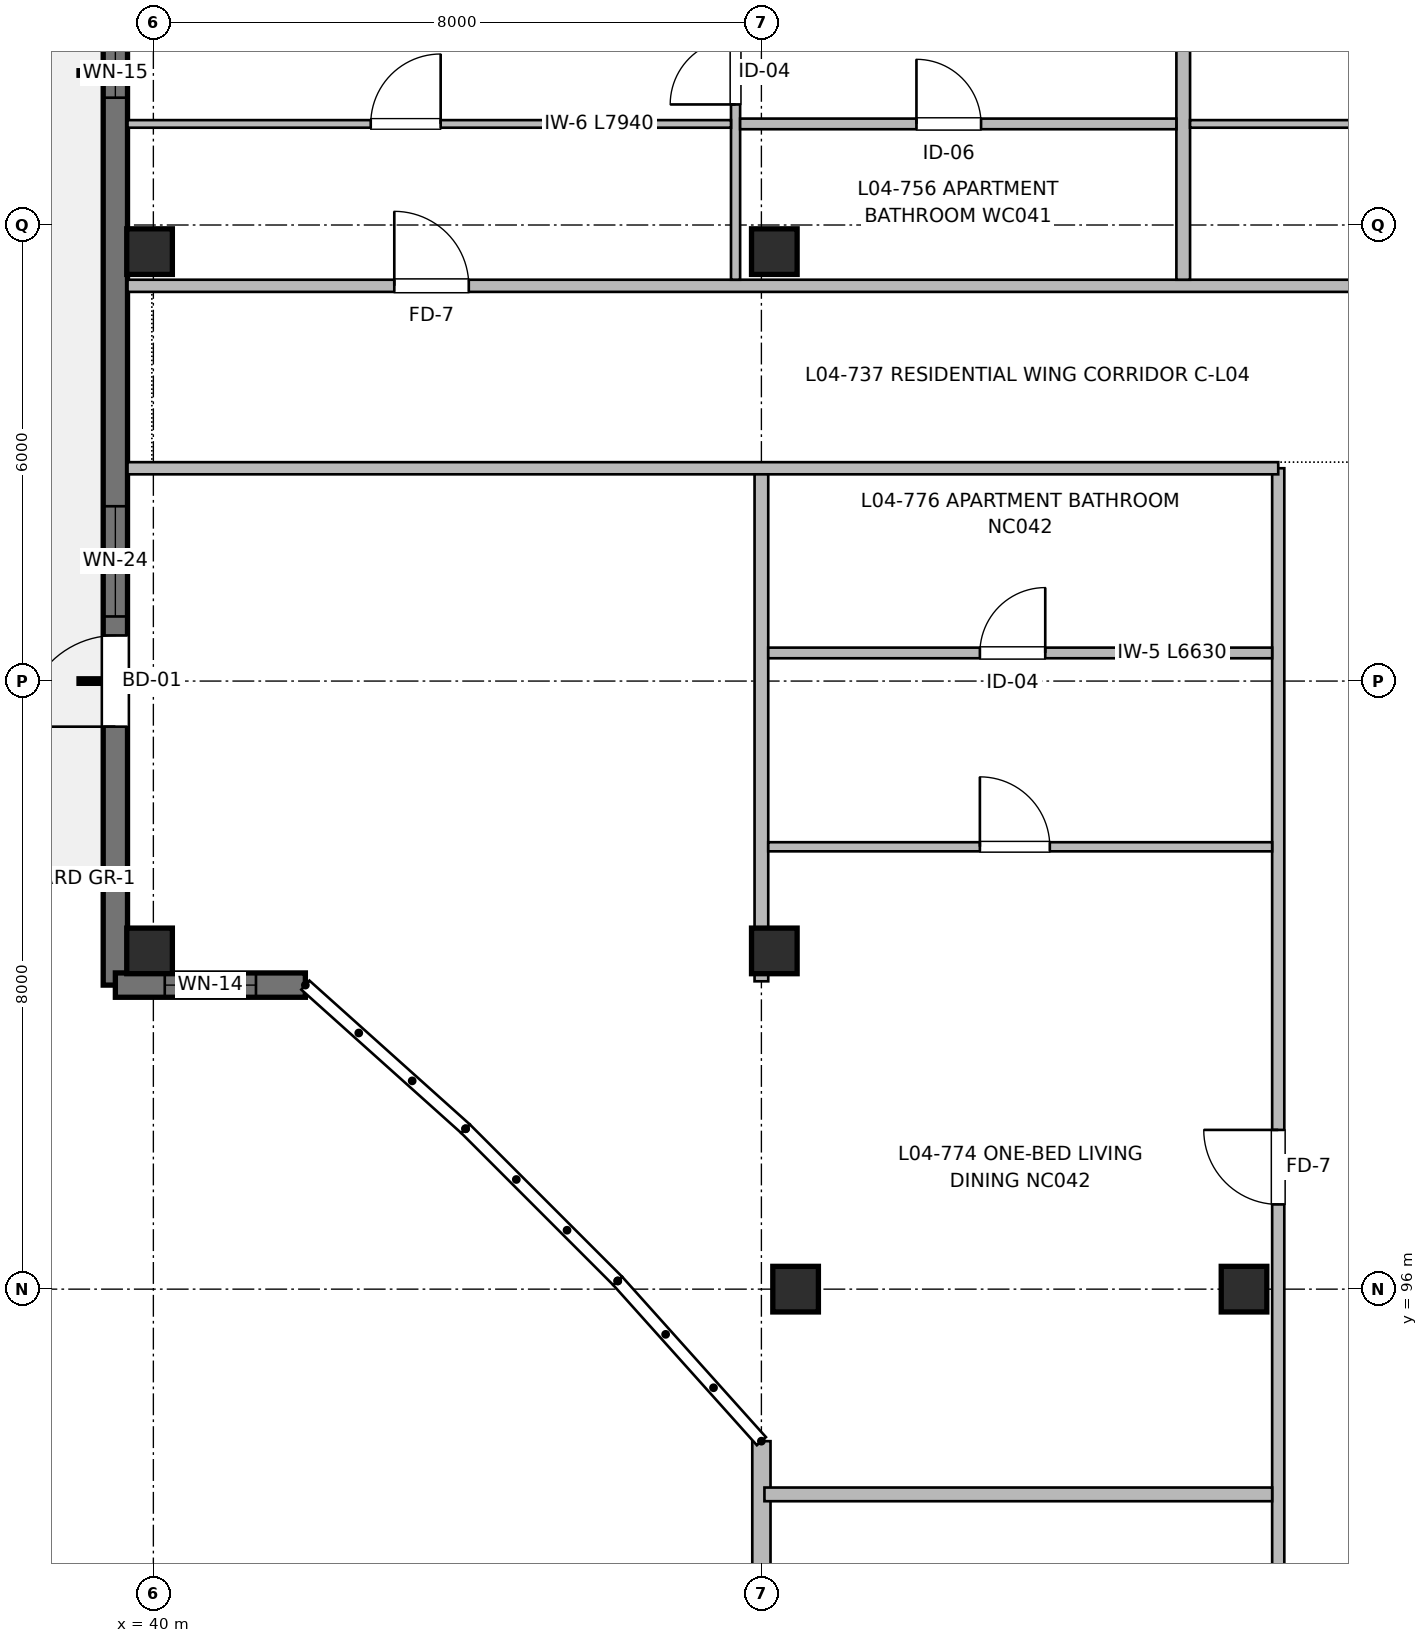
"""IFC4 building model, lengths in metres.
Left out: names, types, materials, properties, quantities, classifications, styles, units other than length and angle.
Written with IfcOpenShell. Run it as: python <this file> out.ifc"""

import sys

from ifc_helpers import new_model, si_unit, direction, frame, frame_2d, origin, origin_2d, place, context, subcontext, project, spatial, rectangle, extrude, element, fill, save


model = new_model("IFC4")
c1 = context("Model", 3, precision=1e-05, world=origin(), true_north=direction((0.0, 1.0)))
c2 = subcontext(c1, "Body", "Model", "MODEL_VIEW")
j1 = project(units=[si_unit("LENGTHUNIT", "METRE"), si_unit("PLANEANGLEUNIT", "RADIAN")], contexts=[c1])
p1 = place(None, origin())
s1 = spatial("IfcSite", under=j1, at=p1, CompositionType="ELEMENT")
p2 = place(p1, origin())
s2 = spatial("IfcBuilding", under=s1, at=p2, CompositionType="ELEMENT")
p3 = place(p2, frame((0.0, 0.0, 13.76)))
s3 = spatial("IfcBuildingStorey", under=s2, at=p3, CompositionType="ELEMENT", Elevation=13.76)
for number, where, z_axis, x_axis in (
    (1, (39.95, 100.45, 0.0), (0.0, 0.0, 1.0), (1.0, 0.0, 0.0)),
    (2, (39.95, 109.65, 0.0), (0.0, 0.0, 1.0), (1.0, 0.0, 0.0)),
    (3, (48.17, 100.45, 0.0), (0.0, 0.0, 1.0), (1.0, 0.0, 0.0)),
    (4, (48.17, 109.65, 0.0), (0.0, 0.0, 1.0), (1.0, 0.0, 0.0)),
    (5, (48.45, 96.0, 0.0), (0.0, 0.0, 1.0), (1.0, 0.0, 0.0)),
    (6, (54.35, 96.0, 0.0), (0.0, 0.0, 1.0), (1.0, 0.0, 0.0)),
):
    element("IfcColumn", number, at=place(p3, frame(where, z_axis=z_axis, x_axis=x_axis)), inside=s3, PredefinedType="COLUMN", context=c2, shape_type="SweptSolid", body=[
        extrude(rectangle(XDim=0.6, YDim=0.6, at=origin_2d()), origin(), (0.0, 0.0, 1.0), 3.2),
    ])
p4 = place(p3, frame((39.5, 100.0, 0.0), z_axis=(0.0, 0.0, 1.0), x_axis=(0.0, 1.0, 0.0)))
e7 = element("IfcWall", 7, at=p4, inside=s3, PredefinedType="SHEAR", context=c2, shape_type="SweptSolid", body=[
    extrude(rectangle(XDim=16.0, YDim=0.32, at=frame_2d((8.0, 0.0))), origin(), (0.0, 0.0, 1.0), 2.98),
])
p5 = place(p4, frame((3.4, 0.0, 0.0)))
e8 = element("IfcOpeningElement", 8, at=p5, cuts=e7, PredefinedType="OPENING", context=c2, shape_type="SweptSolid", body=[
    extrude(rectangle(XDim=1.2, YDim=2.2, at=frame_2d((0.6, 1.1))), frame((0.0, 0.17, 0.0), z_axis=(0.0, -1.0, 0.0), x_axis=(1.0, 0.0, 0.0)), (0.0, 0.0, 1.0), 0.34),
])
p6 = place(p4, frame((4.85, 0.0, 0.77)))
e9 = element("IfcOpeningElement", 9, at=p6, cuts=e7, PredefinedType="OPENING", context=c2, shape_type="SweptSolid", body=[
    extrude(rectangle(XDim=1.45, YDim=1.45, at=frame_2d((0.725, 0.725))), frame((0.0, 0.17, 0.0), z_axis=(0.0, -1.0, 0.0), x_axis=(1.0, 0.0, 0.0)), (0.0, 0.0, 1.0), 0.34),
])
p7 = place(p4, frame((11.675, 0.0, 0.9)))
e10 = element("IfcOpeningElement", 10, at=p7, cuts=e7, PredefinedType="OPENING", context=c2, shape_type="SweptSolid", body=[
    extrude(rectangle(XDim=0.65, YDim=0.95, at=frame_2d((0.325, 0.475))), frame((0.0, 0.17, 0.0), z_axis=(0.0, -1.0, 0.0), x_axis=(1.0, 0.0, 0.0)), (0.0, 0.0, 1.0), 0.34),
])
p8 = place(p3, frame((42.0, 100.0, 0.0), z_axis=(0.0, 0.0, 1.0), x_axis=(-1.0, 0.0, 0.0)))
e11 = element("IfcWall", 11, at=p8, inside=s3, PredefinedType="SHEAR", context=c2, shape_type="SweptSolid", body=[
    extrude(rectangle(XDim=2.5, YDim=0.32, at=frame_2d((1.25, 0.0))), origin(), (0.0, 0.0, 1.0), 2.98),
])
p9 = place(p8, frame((0.65, 0.0, 0.9)))
e12 = element("IfcOpeningElement", 12, at=p9, cuts=e11, PredefinedType="OPENING", context=c2, shape_type="SweptSolid", body=[
    extrude(rectangle(XDim=1.2, YDim=1.05, at=frame_2d((0.6, 0.525))), frame((0.0, 0.17, 0.0), z_axis=(0.0, -1.0, 0.0), x_axis=(1.0, 0.0, 0.0)), (0.0, 0.0, 1.0), 0.34),
])
p10 = place(p3, frame((48.0, 56.0, 0.0), z_axis=(0.0, 0.0, 1.0), x_axis=(0.0, 1.0, 0.0)))
e13 = element("IfcWall", 13, at=p10, inside=s3, PredefinedType="SOLIDWALL", context=c2, shape_type="SweptSolid", body=[
    extrude(rectangle(XDim=38.0, YDim=0.24, at=frame_2d((19.0, 0.0))), origin(), (0.0, 0.0, 1.0), 2.98),
])
p11 = place(p10, frame((4.15, 0.0, 0.0)))
e14 = element("IfcOpeningElement", 14, at=p11, cuts=e13, PredefinedType="OPENING", context=c2, shape_type="SweptSolid", body=[
    extrude(rectangle(XDim=1.2, YDim=2.2, at=frame_2d((0.6, 1.1))), frame((0.0, 0.13, 0.0), z_axis=(0.0, -1.0, 0.0), x_axis=(1.0, 0.0, 0.0)), (0.0, 0.0, 1.0), 0.26),
])
p12 = place(p10, frame((6.05, 0.0, 0.77)))
e15 = element("IfcOpeningElement", 15, at=p12, cuts=e13, PredefinedType="OPENING", context=c2, shape_type="SweptSolid", body=[
    extrude(rectangle(XDim=1.45, YDim=1.45, at=frame_2d((0.725, 0.725))), frame((0.0, 0.13, 0.0), z_axis=(0.0, -1.0, 0.0), x_axis=(1.0, 0.0, 0.0)), (0.0, 0.0, 1.0), 0.26),
])
p13 = place(p10, frame((13.925, 0.0, 0.9)))
e16 = element("IfcOpeningElement", 16, at=p13, cuts=e13, PredefinedType="OPENING", context=c2, shape_type="SweptSolid", body=[
    extrude(rectangle(XDim=0.65, YDim=0.95, at=frame_2d((0.325, 0.475))), frame((0.0, 0.13, 0.0), z_axis=(0.0, -1.0, 0.0), x_axis=(1.0, 0.0, 0.0)), (0.0, 0.0, 1.0), 0.26),
])
p14 = place(p10, frame((24.05, 0.0, 0.62)))
e17 = element("IfcOpeningElement", 17, at=p14, cuts=e13, PredefinedType="OPENING", context=c2, shape_type="SweptSolid", body=[
    extrude(rectangle(XDim=1.1, YDim=1.6, at=frame_2d((0.55, 0.8))), frame((0.0, 0.13, 0.0), z_axis=(0.0, -1.0, 0.0), x_axis=(1.0, 0.0, 0.0)), (0.0, 0.0, 1.0), 0.26),
])
p15 = place(p10, frame((31.9, 0.0, 0.47)))
e18 = element("IfcOpeningElement", 18, at=p15, cuts=e13, PredefinedType="OPENING", context=c2, shape_type="SweptSolid", body=[
    extrude(rectangle(XDim=2.7, YDim=1.75, at=frame_2d((1.35, 0.875))), frame((0.0, 0.13, 0.0), z_axis=(0.0, -1.0, 0.0), x_axis=(1.0, 0.0, 0.0)), (0.0, 0.0, 1.0), 0.26),
])
p16 = place(p3, frame((54.8, 56.16, 0.0), z_axis=(0.0, 0.0, 1.0), x_axis=(0.0, 1.0, 0.0)))
e19 = element("IfcWall", 19, at=p16, inside=s3, PredefinedType="PARTITIONING", context=c2, shape_type="SweptSolid", body=[
    extrude(rectangle(XDim=50.64, YDim=0.16, at=frame_2d((25.32, 0.0))), origin(), (0.0, 0.0, 1.0), 2.935),
])
p17 = place(p16, frame((12.84, 0.0, 0.0)))
e20 = element("IfcOpeningElement", 20, at=p17, cuts=e19, PredefinedType="OPENING", context=c2, shape_type="SweptSolid", body=[
    extrude(rectangle(XDim=1.1, YDim=2.15, at=frame_2d((0.55, 1.075))), frame((0.0, 0.09, 0.0), z_axis=(0.0, -1.0, 0.0), x_axis=(1.0, 0.0, 0.0)), (0.0, 0.0, 1.0), 0.18),
])
p18 = place(p16, frame((19.24, 0.0, 0.0)))
e21 = element("IfcOpeningElement", 21, at=p18, cuts=e19, PredefinedType="OPENING", context=c2, shape_type="SweptSolid", body=[
    extrude(rectangle(XDim=1.6, YDim=2.15, at=frame_2d((0.8, 1.075))), frame((0.0, 0.09, 0.0), z_axis=(0.0, -1.0, 0.0), x_axis=(1.0, 0.0, 0.0)), (0.0, 0.0, 1.0), 0.18),
])
p19 = place(p16, frame((1.8, 0.0, 0.0)))
e22 = element("IfcOpeningElement", 22, at=p19, cuts=e19, PredefinedType="OPENING", context=c2, shape_type="SweptSolid", body=[
    extrude(rectangle(XDim=0.96, YDim=2.15, at=frame_2d((0.48, 1.075))), frame((0.0, 0.09, 0.0), z_axis=(0.0, -1.0, 0.0), x_axis=(1.0, 0.0, 0.0)), (0.0, 0.0, 1.0), 0.18),
])
p20 = place(p16, frame((32.745, 0.0, 0.0)))
e23 = element("IfcOpeningElement", 23, at=p20, cuts=e19, PredefinedType="OPENING", context=c2, shape_type="SweptSolid", body=[
    extrude(rectangle(XDim=0.98, YDim=2.15, at=frame_2d((0.49, 1.075))), frame((0.0, 0.09, 0.0), z_axis=(0.0, -1.0, 0.0), x_axis=(1.0, 0.0, 0.0)), (0.0, 0.0, 1.0), 0.18),
])
p21 = place(p16, frame((40.955, 0.0, 0.0)))
e24 = element("IfcOpeningElement", 24, at=p21, cuts=e19, PredefinedType="OPENING", context=c2, shape_type="SweptSolid", body=[
    extrude(rectangle(XDim=0.98, YDim=2.15, at=frame_2d((0.49, 1.075))), frame((0.0, 0.09, 0.0), z_axis=(0.0, -1.0, 0.0), x_axis=(1.0, 0.0, 0.0)), (0.0, 0.0, 1.0), 0.18),
])
p22 = place(p3, frame((39.66, 106.8, 0.0), z_axis=(0.0, 0.0, 1.0), x_axis=(1.0, 0.0, 0.0)))
e25 = element("IfcWall", 25, at=p22, inside=s3, PredefinedType="PARTITIONING", context=c2, shape_type="SweptSolid", body=[
    extrude(rectangle(XDim=15.14, YDim=0.16, at=frame_2d((7.57, 0.0))), origin(), (0.0, 0.0, 1.0), 2.935),
])
p23 = place(p3, frame((39.66, 109.2, 0.0), z_axis=(0.0, 0.0, 1.0), x_axis=(1.0, 0.0, 0.0)))
e26 = element("IfcWall", 26, at=p23, inside=s3, PredefinedType="PARTITIONING", context=c2, shape_type="SweptSolid", body=[
    extrude(rectangle(XDim=41.68, YDim=0.16, at=frame_2d((20.84, 0.0))), origin(), (0.0, 0.0, 1.0), 2.935),
])
p24 = place(p23, frame((3.51, 0.0, 0.0)))
e27 = element("IfcOpeningElement", 27, at=p24, cuts=e26, PredefinedType="OPENING", context=c2, shape_type="SweptSolid", body=[
    extrude(rectangle(XDim=0.98, YDim=2.15, at=frame_2d((0.49, 1.075))), frame((0.0, 0.09, 0.0), z_axis=(0.0, -1.0, 0.0), x_axis=(1.0, 0.0, 0.0)), (0.0, 0.0, 1.0), 0.18),
])
p25 = place(p23, frame((17.47, 0.0, 0.0)))
e28 = element("IfcOpeningElement", 28, at=p25, cuts=e26, PredefinedType="OPENING", context=c2, shape_type="SweptSolid", body=[
    extrude(rectangle(XDim=0.98, YDim=2.15, at=frame_2d((0.49, 1.075))), frame((0.0, 0.09, 0.0), z_axis=(0.0, -1.0, 0.0), x_axis=(1.0, 0.0, 0.0)), (0.0, 0.0, 1.0), 0.18),
])
p26 = place(p23, frame((31.39, 0.0, 0.0)))
e29 = element("IfcOpeningElement", 29, at=p26, cuts=e26, PredefinedType="OPENING", context=c2, shape_type="SweptSolid", body=[
    extrude(rectangle(XDim=0.98, YDim=2.15, at=frame_2d((0.49, 1.075))), frame((0.0, 0.09, 0.0), z_axis=(0.0, -1.0, 0.0), x_axis=(1.0, 0.0, 0.0)), (0.0, 0.0, 1.0), 0.18),
])
p27 = place(p3, frame((48.0, 100.05, 0.0), z_axis=(0.0, 0.0, 1.0), x_axis=(0.0, 1.0, 0.0)))
e30 = element("IfcWall", 30, at=p27, inside=s3, PredefinedType="PARTITIONING", context=c2, shape_type="SweptSolid", body=[
    extrude(rectangle(XDim=6.67, YDim=0.18, at=frame_2d((3.335, 0.0))), origin(), (0.0, 0.0, 1.0), 2.68),
])
p28 = place(p3, frame((53.55, 109.28, 0.0), z_axis=(0.0, 0.0, 1.0), x_axis=(0.0, 1.0, 0.0)))
e31 = element("IfcWall", 31, at=p28, inside=s3, PredefinedType="PARTITIONING", context=c2, shape_type="SweptSolid", body=[
    extrude(rectangle(XDim=6.6, YDim=0.18, at=frame_2d((3.3, 0.0))), origin(), (0.0, 0.0, 1.0), 2.935),
])
p29 = place(p3, frame((47.66, 109.28, 0.0), z_axis=(0.0, 0.0, 1.0), x_axis=(0.0, 1.0, 0.0)))
e32 = element("IfcWall", 32, at=p29, inside=s3, PredefinedType="PARTITIONING", context=c2, shape_type="SweptSolid", body=[
    extrude(rectangle(XDim=6.6, YDim=0.12, at=frame_2d((3.3, 0.0))), origin(), (0.0, 0.0, 1.0), 2.935),
])
p30 = place(p29, frame((2.306, 0.0, 0.0)))
e33 = element("IfcOpeningElement", 33, at=p30, cuts=e32, PredefinedType="OPENING", context=c2, shape_type="SweptSolid", body=[
    extrude(rectangle(XDim=0.86, YDim=2.1, at=frame_2d((0.43, 1.05))), frame((0.0, 0.07, 0.0), z_axis=(0.0, -1.0, 0.0), x_axis=(1.0, 0.0, 0.0)), (0.0, 0.0, 1.0), 0.14),
])
p31 = place(p29, frame((4.097, 0.0, 0.0)))
e34 = element("IfcOpeningElement", 34, at=p31, cuts=e32, PredefinedType="OPENING", context=c2, shape_type="SweptSolid", body=[
    extrude(rectangle(XDim=0.9, YDim=2.1, at=frame_2d((0.45, 1.05))), frame((0.0, 0.07, 0.0), z_axis=(0.0, -1.0, 0.0), x_axis=(1.0, 0.0, 0.0)), (0.0, 0.0, 1.0), 0.14),
])
p32 = place(p3, frame((47.72, 111.33, 0.0), z_axis=(0.0, 0.0, 1.0), x_axis=(1.0, 0.0, 0.0)))
e35 = element("IfcWall", 35, at=p32, inside=s3, PredefinedType="PARTITIONING", context=c2, shape_type="SweptSolid", body=[
    extrude(rectangle(XDim=5.74, YDim=0.14, at=frame_2d((2.87, 0.0))), origin(), (0.0, 0.0, 1.0), 2.935),
])
p33 = place(p32, frame((2.32, 0.0, 0.0)))
e36 = element("IfcOpeningElement", 36, at=p33, cuts=e35, PredefinedType="OPENING", context=c2, shape_type="SweptSolid", body=[
    extrude(rectangle(XDim=0.85, YDim=2.05, at=frame_2d((0.425, 1.025))), frame((0.0, 0.08, 0.0), z_axis=(0.0, -1.0, 0.0), x_axis=(1.0, 0.0, 0.0)), (0.0, 0.0, 1.0), 0.16),
])
p34 = place(p3, frame((39.66, 111.33, 0.0), z_axis=(0.0, 0.0, 1.0), x_axis=(1.0, 0.0, 0.0)))
e37 = element("IfcWall", 37, at=p34, inside=s3, PredefinedType="PARTITIONING", context=c2, shape_type="SweptSolid", body=[
    extrude(rectangle(XDim=7.94, YDim=0.1, at=frame_2d((3.97, 0.0))), origin(), (0.0, 0.0, 1.0), 2.935),
])
p35 = place(p34, frame((3.2, 0.0, 0.0)))
e38 = element("IfcOpeningElement", 38, at=p35, cuts=e37, PredefinedType="OPENING", context=c2, shape_type="SweptSolid", body=[
    extrude(rectangle(XDim=0.92, YDim=2.1, at=frame_2d((0.46, 1.05))), frame((0.0, 0.06, 0.0), z_axis=(0.0, -1.0, 0.0), x_axis=(1.0, 0.0, 0.0)), (0.0, 0.0, 1.0), 0.12),
])
p36 = place(p3, frame((53.64, 111.33, 0.0), z_axis=(0.0, 0.0, 1.0), x_axis=(1.0, 0.0, 0.0)))
e39 = element("IfcWall", 39, at=p36, inside=s3, PredefinedType="PARTITIONING", context=c2, shape_type="SweptSolid", body=[
    extrude(rectangle(XDim=7.9, YDim=0.1, at=frame_2d((3.95, 0.0))), origin(), (0.0, 0.0, 1.0), 2.935),
])
p37 = place(p36, frame((3.184, 0.0, 0.0)))
e40 = element("IfcOpeningElement", 40, at=p37, cuts=e39, PredefinedType="OPENING", context=c2, shape_type="SweptSolid", body=[
    extrude(rectangle(XDim=0.92, YDim=2.1, at=frame_2d((0.46, 1.05))), frame((0.0, 0.06, 0.0), z_axis=(0.0, -1.0, 0.0), x_axis=(1.0, 0.0, 0.0)), (0.0, 0.0, 1.0), 0.12),
])
p38 = place(p3, frame((48.04, 93.3, 0.0), z_axis=(0.0, 0.0, 1.0), x_axis=(1.0, 0.0, 0.0)))
e41 = element("IfcWall", 41, at=p38, inside=s3, PredefinedType="PARTITIONING", context=c2, shape_type="SweptSolid", body=[
    extrude(rectangle(XDim=6.68, YDim=0.18, at=frame_2d((3.34, 0.0))), origin(), (0.0, 0.0, 1.0), 2.935),
])
p39 = place(p3, frame((48.09, 101.82, 0.0), z_axis=(0.0, 0.0, 1.0), x_axis=(1.0, 0.0, 0.0)))
e42 = element("IfcWall", 42, at=p39, inside=s3, PredefinedType="PARTITIONING", context=c2, shape_type="SweptSolid", body=[
    extrude(rectangle(XDim=6.63, YDim=0.12, at=frame_2d((3.315, 0.0))), origin(), (0.0, 0.0, 1.0), 2.935),
])
p40 = place(p39, frame((2.785, 0.0, 0.0)))
e43 = element("IfcOpeningElement", 43, at=p40, cuts=e42, PredefinedType="OPENING", context=c2, shape_type="SweptSolid", body=[
    extrude(rectangle(XDim=0.92, YDim=2.1, at=frame_2d((0.46, 1.05))), frame((0.0, 0.07, 0.0), z_axis=(0.0, -1.0, 0.0), x_axis=(1.0, 0.0, 0.0)), (0.0, 0.0, 1.0), 0.14),
])
p41 = place(p3, frame((48.09, 104.37, 0.0), z_axis=(0.0, 0.0, 1.0), x_axis=(1.0, 0.0, 0.0)))
e44 = element("IfcWall", 44, at=p41, inside=s3, PredefinedType="PARTITIONING", context=c2, shape_type="SweptSolid", body=[
    extrude(rectangle(XDim=6.63, YDim=0.14, at=frame_2d((3.315, 0.0))), origin(), (0.0, 0.0, 1.0), 2.935),
])
p42 = place(p41, frame((2.785, 0.0, 0.0)))
e45 = element("IfcOpeningElement", 45, at=p42, cuts=e44, PredefinedType="OPENING", context=c2, shape_type="SweptSolid", body=[
    extrude(rectangle(XDim=0.86, YDim=2.1, at=frame_2d((0.43, 1.05))), frame((0.0, 0.08, 0.0), z_axis=(0.0, -1.0, 0.0), x_axis=(1.0, 0.0, 0.0)), (0.0, 0.0, 1.0), 0.16),
])
p43 = place(p5, origin())
e46 = element("IfcDoor", 46, at=p43, inside=s3, OperationType="SINGLE_SWING_LEFT", PredefinedType="DOOR", context=c2, shape_type="SweptSolid", body=[
    extrude(rectangle(XDim=1.2, YDim=2.2, at=frame_2d((0.6, 1.1))), frame((0.0, 0.025, 0.0), z_axis=(0.0, -1.0, 0.0), x_axis=(1.0, 0.0, 0.0)), (0.0, 0.0, 1.0), 0.05),
])
fill(e8, e46)
p44 = place(p6, origin())
e47 = element("IfcWindow", 47, at=p44, inside=s3, PartitioningType="SINGLE_PANEL", PredefinedType="WINDOW", context=c2, shape_type="SweptSolid", body=[
    extrude(rectangle(XDim=1.45, YDim=1.45, at=frame_2d((0.725, 0.725))), frame((0.0, 0.03, 0.0), z_axis=(0.0, -1.0, 0.0), x_axis=(1.0, 0.0, 0.0)), (0.0, 0.0, 1.0), 0.06),
])
fill(e9, e47)
p45 = place(p7, origin())
e48 = element("IfcWindow", 48, at=p45, inside=s3, PartitioningType="SINGLE_PANEL", PredefinedType="WINDOW", context=c2, shape_type="SweptSolid", body=[
    extrude(rectangle(XDim=0.65, YDim=0.95, at=frame_2d((0.325, 0.475))), frame((0.0, 0.03, 0.0), z_axis=(0.0, -1.0, 0.0), x_axis=(1.0, 0.0, 0.0)), (0.0, 0.0, 1.0), 0.06),
])
fill(e10, e48)
p46 = place(p9, origin())
e49 = element("IfcWindow", 49, at=p46, inside=s3, PartitioningType="SINGLE_PANEL", PredefinedType="WINDOW", context=c2, shape_type="SweptSolid", body=[
    extrude(rectangle(XDim=1.2, YDim=1.05, at=frame_2d((0.6, 0.525))), frame((0.0, 0.03, 0.0), z_axis=(0.0, -1.0, 0.0), x_axis=(1.0, 0.0, 0.0)), (0.0, 0.0, 1.0), 0.06),
])
fill(e12, e49)
p47 = place(p24, origin())
e50 = element("IfcDoor", 50, at=p47, inside=s3, OperationType="SINGLE_SWING_LEFT", PredefinedType="DOOR", context=c2, shape_type="SweptSolid", body=[
    extrude(rectangle(XDim=0.98, YDim=2.15, at=frame_2d((0.49, 1.075))), frame((0.0, 0.025, 0.0), z_axis=(0.0, -1.0, 0.0), x_axis=(1.0, 0.0, 0.0)), (0.0, 0.0, 1.0), 0.05),
])
fill(e27, e50)
p48 = place(p35, origin())
e51 = element("IfcDoor", 51, at=p48, inside=s3, OperationType="SINGLE_SWING_RIGHT", PredefinedType="DOOR", context=c2, shape_type="SweptSolid", body=[
    extrude(rectangle(XDim=0.92, YDim=2.1, at=frame_2d((0.46, 1.05))), frame((0.0, 0.025, 0.0), z_axis=(0.0, -1.0, 0.0), x_axis=(1.0, 0.0, 0.0)), (0.0, 0.0, 1.0), 0.05),
])
fill(e38, e51)
p49 = place(p30, origin())
e52 = element("IfcDoor", 52, at=p49, inside=s3, OperationType="SINGLE_SWING_LEFT", PredefinedType="DOOR", context=c2, shape_type="SweptSolid", body=[
    extrude(rectangle(XDim=0.86, YDim=2.1, at=frame_2d((0.43, 1.05))), frame((0.0, 0.025, 0.0), z_axis=(0.0, -1.0, 0.0), x_axis=(1.0, 0.0, 0.0)), (0.0, 0.0, 1.0), 0.05),
])
fill(e33, e52)
p50 = place(p33, origin())
e53 = element("IfcDoor", 53, at=p50, inside=s3, OperationType="SINGLE_SWING_LEFT", PredefinedType="DOOR", context=c2, shape_type="SweptSolid", body=[
    extrude(rectangle(XDim=0.85, YDim=2.05, at=frame_2d((0.425, 1.025))), frame((0.0, 0.025, 0.0), z_axis=(0.0, -1.0, 0.0), x_axis=(1.0, 0.0, 0.0)), (0.0, 0.0, 1.0), 0.05),
])
fill(e36, e53)
p51 = place(p42, origin())
e54 = element("IfcDoor", 54, at=p51, inside=s3, OperationType="SINGLE_SWING_RIGHT", PredefinedType="DOOR", context=c2, shape_type="SweptSolid", body=[
    extrude(rectangle(XDim=0.86, YDim=2.1, at=frame_2d((0.43, 1.05))), frame((0.0, 0.025, 0.0), z_axis=(0.0, -1.0, 0.0), x_axis=(1.0, 0.0, 0.0)), (0.0, 0.0, 1.0), 0.05),
])
fill(e45, e54)
p52 = place(p40, origin())
e55 = element("IfcDoor", 55, at=p52, inside=s3, OperationType="SINGLE_SWING_LEFT", PredefinedType="DOOR", context=c2, shape_type="SweptSolid", body=[
    extrude(rectangle(XDim=0.92, YDim=2.1, at=frame_2d((0.46, 1.05))), frame((0.0, 0.025, 0.0), z_axis=(0.0, -1.0, 0.0), x_axis=(1.0, 0.0, 0.0)), (0.0, 0.0, 1.0), 0.05),
])
fill(e43, e55)
p53 = place(p21, origin())
e56 = element("IfcDoor", 56, at=p53, inside=s3, OperationType="SINGLE_SWING_RIGHT", PredefinedType="DOOR", context=c2, shape_type="SweptSolid", body=[
    extrude(rectangle(XDim=0.98, YDim=2.15, at=frame_2d((0.49, 1.075))), frame((0.0, 0.025, 0.0), z_axis=(0.0, -1.0, 0.0), x_axis=(1.0, 0.0, 0.0)), (0.0, 0.0, 1.0), 0.05),
])
fill(e24, e56)
save(model, sys.argv[1])
